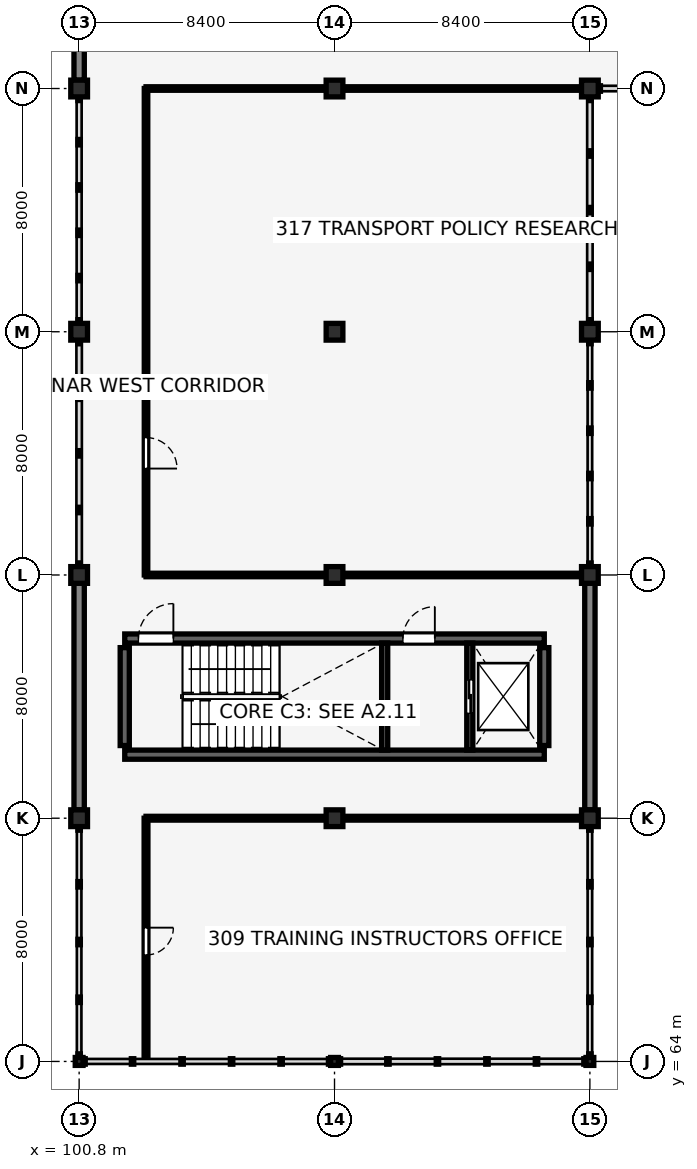
"""IFC4 building model, lengths in metres.
Left out: names, types, materials, properties, quantities, classifications, styles, units other than length and angle.
Written with IfcOpenShell. Run it as: python <this file> out.ifc"""

import sys

from ifc_helpers import new_model, si_unit, direction, frame, frame_2d, origin, origin_2d, place, context, subcontext, project, spatial, rectangle, i_section, extrude, element, fill, save


model = new_model("IFC4")
c1 = context("Model", 3, precision=1e-05, world=origin(), true_north=direction((0.0, 1.0)))
c2 = subcontext(c1, "Body", "Model", "MODEL_VIEW")
j1 = project(units=[si_unit("LENGTHUNIT", "METRE"), si_unit("PLANEANGLEUNIT", "RADIAN")], contexts=[c1])
p1 = place(None, origin())
s1 = spatial("IfcSite", under=j1, at=p1, CompositionType="ELEMENT")
p2 = place(p1, origin())
s2 = spatial("IfcBuilding", under=s1, at=p2, CompositionType="ELEMENT")
p3 = place(p2, frame((0.0, 0.0, 13.36)))
s3 = spatial("IfcBuildingStorey", under=s2, at=p3, CompositionType="ELEMENT", Elevation=13.36)
p4 = place(p3, frame((102.3, 74.09, 0.0), z_axis=(0.0, 0.0, 1.0), x_axis=(1.0, 0.0, 0.0)))
e1 = element("IfcWall", 1, at=p4, inside=s3, PredefinedType="SHEAR", context=c2, shape_type="SweptSolid", body=[
    extrude(rectangle(XDim=13.8, YDim=0.3, at=frame_2d((6.9, 0.0))), origin(), (0.0, 0.0, 1.0), 3.58),
])
p5 = place(p3, frame((102.3, 77.91, 0.0), z_axis=(0.0, 0.0, 1.0), x_axis=(1.0, 0.0, 0.0)))
e2 = element("IfcWall", 2, at=p5, inside=s3, PredefinedType="SHEAR", context=c2, shape_type="SweptSolid", body=[
    extrude(rectangle(XDim=13.8, YDim=0.3, at=frame_2d((6.9, 0.0))), origin(), (0.0, 0.0, 1.0), 3.58),
])
p6 = place(p5, frame((0.45, 0.0, 0.0), z_axis=(0.0, 0.0, 1.0), x_axis=(1.0, 0.0, 0.0)))
e3 = element("IfcOpeningElement", 3, at=p6, cuts=e2, PredefinedType="OPENING", context=c2, shape_type="SweptSolid", body=[
    extrude(rectangle(XDim=1.15, YDim=2.15, at=frame_2d((0.575, 1.075))), frame((0.0, 0.16, 0.0), z_axis=(0.0, -1.0, 0.0), x_axis=(1.0, 0.0, 0.0)), (0.0, 0.0, 1.0), 0.32),
])
p7 = place(p5, frame((9.15, 0.0, 0.0), z_axis=(0.0, 0.0, 1.0), x_axis=(1.0, 0.0, 0.0)))
e4 = element("IfcOpeningElement", 4, at=p7, cuts=e2, PredefinedType="OPENING", context=c2, shape_type="SweptSolid", body=[
    extrude(rectangle(XDim=1.05, YDim=2.15, at=frame_2d((0.525, 1.075))), frame((0.0, 0.16, 0.0), z_axis=(0.0, -1.0, 0.0), x_axis=(1.0, 0.0, 0.0)), (0.0, 0.0, 1.0), 0.32),
])
for number, where, z_axis, x_axis in (
    (5, (102.3, 74.39, 0.0), (0.0, 0.0, 1.0), (0.0, 1.0, 0.0)),
    (6, (116.1, 74.39, 0.0), (0.0, 0.0, 1.0), (0.0, 1.0, 0.0)),
):
    element("IfcWall", number, at=place(p3, frame(where, z_axis=z_axis, x_axis=x_axis)), inside=s3, PredefinedType="SHEAR", context=c2, shape_type="SweptSolid", body=[
        extrude(rectangle(XDim=3.22, YDim=0.3, at=frame_2d((1.61, 0.0))), origin(), (0.0, 0.0, 1.0), 3.58),
    ])
p8 = place(p3, frame((100.8, 64.0, 0.0), z_axis=(0.0, 0.0, 1.0), x_axis=(1.0, 0.0, 0.0)))
e7 = element("IfcColumn", 7, at=p8, inside=s3, PredefinedType="COLUMN", context=c2, shape_type="SweptSolid", body=[
    extrude(i_section(OverallWidth=0.256, OverallDepth=0.26, WebThickness=0.01, FlangeThickness=0.017, FilletRadius=0.013, at=origin_2d()), origin(), (0.0, 0.0, 1.0), 10.34),
])
for number, where, z_axis, x_axis in (
    (8, (100.8, 72.0, 0.0), (0.0, 0.0, 1.0), (1.0, 0.0, 0.0)),
    (9, (100.8, 80.0, 0.0), (0.0, 0.0, 1.0), (1.0, 0.0, 0.0)),
    (10, (100.8, 88.0, 0.0), (0.0, 0.0, 1.0), (1.0, 0.0, 0.0)),
    (11, (100.8, 96.0, 0.0), (0.0, 0.0, 1.0), (1.0, 0.0, 0.0)),
):
    element("IfcColumn", number, at=place(p3, frame(where, z_axis=z_axis, x_axis=x_axis)), inside=s3, PredefinedType="COLUMN", context=c2, shape_type="SweptSolid", body=[
        extrude(rectangle(XDim=0.55, YDim=0.55, at=origin_2d()), origin(), (0.0, 0.0, 1.0), 3.58),
    ])
p9 = place(p3, frame((109.2, 64.0, 0.0), z_axis=(0.0, 0.0, 1.0), x_axis=(1.0, 0.0, 0.0)))
e12 = element("IfcColumn", 12, at=p9, inside=s3, PredefinedType="COLUMN", context=c2, shape_type="SweptSolid", body=[
    extrude(i_section(OverallWidth=0.256, OverallDepth=0.26, WebThickness=0.01, FlangeThickness=0.017, FilletRadius=0.013, at=origin_2d()), origin(), (0.0, 0.0, 1.0), 3.58),
])
for number, where, z_axis, x_axis in (
    (13, (109.2, 72.0, 0.0), (0.0, 0.0, 1.0), (1.0, 0.0, 0.0)),
    (14, (109.2, 80.0, 0.0), (0.0, 0.0, 1.0), (1.0, 0.0, 0.0)),
    (15, (109.2, 88.0, 0.0), (0.0, 0.0, 1.0), (1.0, 0.0, 0.0)),
    (16, (109.2, 96.0, 0.0), (0.0, 0.0, 1.0), (1.0, 0.0, 0.0)),
):
    element("IfcColumn", number, at=place(p3, frame(where, z_axis=z_axis, x_axis=x_axis)), inside=s3, PredefinedType="COLUMN", context=c2, shape_type="SweptSolid", body=[
        extrude(rectangle(XDim=0.55, YDim=0.55, at=origin_2d()), origin(), (0.0, 0.0, 1.0), 3.58),
    ])
p10 = place(p3, frame((117.6, 64.0, 0.0), z_axis=(0.0, 0.0, 1.0), x_axis=(1.0, 0.0, 0.0)))
e17 = element("IfcColumn", 17, at=p10, inside=s3, PredefinedType="COLUMN", context=c2, shape_type="SweptSolid", body=[
    extrude(i_section(OverallWidth=0.256, OverallDepth=0.26, WebThickness=0.01, FlangeThickness=0.017, FilletRadius=0.013, at=origin_2d()), origin(), (0.0, 0.0, 1.0), 3.58),
])
for number, where, z_axis, x_axis in (
    (18, (117.6, 72.0, 0.0), (0.0, 0.0, 1.0), (1.0, 0.0, 0.0)),
    (19, (117.6, 80.0, 0.0), (0.0, 0.0, 1.0), (1.0, 0.0, 0.0)),
    (20, (117.6, 88.0, 0.0), (0.0, 0.0, 1.0), (1.0, 0.0, 0.0)),
    (21, (117.6, 96.0, 0.0), (0.0, 0.0, 1.0), (1.0, 0.0, 0.0)),
):
    element("IfcColumn", number, at=place(p3, frame(where, z_axis=z_axis, x_axis=x_axis)), inside=s3, PredefinedType="COLUMN", context=c2, shape_type="SweptSolid", body=[
        extrude(rectangle(XDim=0.55, YDim=0.55, at=origin_2d()), origin(), (0.0, 0.0, 1.0), 3.58),
    ])
for number, where, z_axis, x_axis in (
    (22, (117.6, 72.275, 0.0), (0.0, 0.0, 1.0), (0.0, 1.0, 0.0)),
    (23, (100.8, 72.275, 0.0), (0.0, 0.0, 1.0), (0.0, 1.0, 0.0)),
):
    element("IfcWall", number, at=place(p3, frame(where, z_axis=z_axis, x_axis=x_axis)), inside=s3, PredefinedType="SOLIDWALL", context=c2, shape_type="SweptSolid", body=[
        extrude(rectangle(XDim=7.45, YDim=0.34, at=frame_2d((3.725, 0.0))), origin(), (0.0, 0.0, 1.0), 3.28),
    ])
p11 = place(p3, frame((100.8, 96.275, 0.0), z_axis=(0.0, 0.0, 1.0), x_axis=(0.0, 1.0, 0.0)))
e24 = element("IfcWall", 24, at=p11, inside=s3, PredefinedType="SOLIDWALL", context=c2, shape_type="SweptSolid", body=[
    extrude(rectangle(XDim=7.595, YDim=0.34, at=frame_2d((3.797, 0.0))), origin(), (0.0, 0.0, 1.0), 3.28),
])
p12 = place(p11, frame((2.897, 0.0, 0.9), z_axis=(0.0, 0.0, 1.0), x_axis=(1.0, 0.0, 0.0)))
e25 = element("IfcOpeningElement", 25, at=p12, cuts=e24, PredefinedType="OPENING", context=c2, shape_type="SweptSolid", body=[
    extrude(rectangle(XDim=1.8, YDim=1.45, at=frame_2d((0.9, 0.725))), frame((0.0, 0.18, 0.0), z_axis=(0.0, -1.0, 0.0), x_axis=(1.0, 0.0, 0.0)), (0.0, 0.0, 1.0), 0.36),
])
p13 = place(p3, frame((110.85, 74.24, 0.0), z_axis=(0.0, 0.0, 1.0), x_axis=(0.0, 1.0, 0.0)))
e26 = element("IfcWall", 26, at=p13, inside=s3, PredefinedType="SHEAR", context=c2, shape_type="SweptSolid", body=[
    extrude(rectangle(XDim=3.52, YDim=0.2, at=frame_2d((1.76, 0.0))), origin(), (0.0, 0.0, 1.0), 3.58),
])
p14 = place(p3, frame((113.65, 74.24, 0.0), z_axis=(0.0, 0.0, 1.0), x_axis=(0.0, 1.0, 0.0)))
e27 = element("IfcWall", 27, at=p14, inside=s3, PredefinedType="SHEAR", context=c2, shape_type="SweptSolid", body=[
    extrude(rectangle(XDim=3.52, YDim=0.2, at=frame_2d((1.76, 0.0))), origin(), (0.0, 0.0, 1.0), 3.58),
])
p15 = place(p14, frame((1.21, 0.0, 0.0), z_axis=(0.0, 0.0, 1.0), x_axis=(1.0, 0.0, 0.0)))
e28 = element("IfcOpeningElement", 28, at=p15, cuts=e27, PredefinedType="OPENING", context=c2, shape_type="SweptSolid", body=[
    extrude(rectangle(XDim=1.1, YDim=2.15, at=frame_2d((0.55, 1.075))), frame((0.0, 0.11, 0.0), z_axis=(0.0, -1.0, 0.0), x_axis=(1.0, 0.0, 0.0)), (0.0, 0.0, 1.0), 0.22),
])
p16 = place(p3, frame((103.0, 64.04, 0.0), z_axis=(0.0, 0.0, 1.0), x_axis=(0.0, 1.0, 0.0)))
e29 = element("IfcWall", 29, at=p16, inside=s3, PredefinedType="PARTITIONING", context=c2, shape_type="SweptSolid", body=[
    extrude(rectangle(XDim=7.96, YDim=0.125, at=frame_2d((3.98, 0.0))), origin(), (0.0, 0.0, 1.0), 3.58),
])
p17 = place(p16, frame((4.36, 0.0, 0.0), z_axis=(0.0, 0.0, 1.0), x_axis=(-1.0, 0.0, 0.0)))
e30 = element("IfcOpeningElement", 30, at=p17, cuts=e29, PredefinedType="OPENING", context=c2, shape_type="SweptSolid", body=[
    extrude(rectangle(XDim=0.9, YDim=2.1, at=frame_2d((0.45, 1.05))), frame((0.0, 0.073, 0.0), z_axis=(0.0, -1.0, 0.0), x_axis=(1.0, 0.0, 0.0)), (0.0, 0.0, 1.0), 0.145),
])
p18 = place(p3, frame((103.0, 80.0, 0.0), z_axis=(0.0, 0.0, 1.0), x_axis=(0.0, 1.0, 0.0)))
e31 = element("IfcWall", 31, at=p18, inside=s3, PredefinedType="PARTITIONING", context=c2, shape_type="SweptSolid", body=[
    extrude(rectangle(XDim=16.0, YDim=0.115, at=frame_2d((8.0, 0.0))), origin(), (0.0, 0.0, 1.0), 3.58),
])
p19 = place(p18, frame((4.52, 0.0, 0.0), z_axis=(0.0, 0.0, 1.0), x_axis=(-1.0, 0.0, 0.0)))
e32 = element("IfcOpeningElement", 32, at=p19, cuts=e31, PredefinedType="OPENING", context=c2, shape_type="SweptSolid", body=[
    extrude(rectangle(XDim=1.02, YDim=2.16, at=frame_2d((0.51, 1.08))), frame((0.0, 0.067, 0.0), z_axis=(0.0, -1.0, 0.0), x_axis=(1.0, 0.0, 0.0)), (0.0, 0.0, 1.0), 0.135),
])
p20 = place(p3, frame((103.0, 72.0, 0.0), z_axis=(0.0, 0.0, 1.0), x_axis=(1.0, 0.0, 0.0)))
e33 = element("IfcWall", 33, at=p20, inside=s3, PredefinedType="PARTITIONING", context=c2, shape_type="SweptSolid", body=[
    extrude(rectangle(XDim=5.935, YDim=0.125, at=frame_2d((2.968, 0.0))), origin(), (0.0, 0.0, 1.0), 3.123),
])
p21 = place(p3, frame((109.465, 72.0, 0.0), z_axis=(0.0, 0.0, 1.0), x_axis=(1.0, 0.0, 0.0)))
e34 = element("IfcWall", 34, at=p21, inside=s3, PredefinedType="PARTITIONING", context=c2, shape_type="SweptSolid", body=[
    extrude(rectangle(XDim=7.87, YDim=0.125, at=frame_2d((3.935, 0.0))), origin(), (0.0, 0.0, 1.0), 3.123),
])
p22 = place(p3, frame((103.0, 80.0, 0.0), z_axis=(0.0, 0.0, 1.0), x_axis=(1.0, 0.0, 0.0)))
e35 = element("IfcWall", 35, at=p22, inside=s3, PredefinedType="PARTITIONING", context=c2, shape_type="SweptSolid", body=[
    extrude(rectangle(XDim=5.935, YDim=0.115, at=frame_2d((2.968, 0.0))), origin(), (0.0, 0.0, 1.0), 3.123),
])
p23 = place(p3, frame((109.465, 80.0, 0.0), z_axis=(0.0, 0.0, 1.0), x_axis=(1.0, 0.0, 0.0)))
e36 = element("IfcWall", 36, at=p23, inside=s3, PredefinedType="PARTITIONING", context=c2, shape_type="SweptSolid", body=[
    extrude(rectangle(XDim=7.87, YDim=0.115, at=frame_2d((3.935, 0.0))), origin(), (0.0, 0.0, 1.0), 3.123),
])
p24 = place(p3, frame((103.0, 96.0, 0.0), z_axis=(0.0, 0.0, 1.0), x_axis=(1.0, 0.0, 0.0)))
e37 = element("IfcWall", 37, at=p24, inside=s3, PredefinedType="PARTITIONING", context=c2, shape_type="SweptSolid", body=[
    extrude(rectangle(XDim=5.935, YDim=0.115, at=frame_2d((2.968, 0.0))), origin(), (0.0, 0.0, 1.0), 3.123),
])
p25 = place(p3, frame((109.465, 96.0, 0.0), z_axis=(0.0, 0.0, 1.0), x_axis=(1.0, 0.0, 0.0)))
e38 = element("IfcWall", 38, at=p25, inside=s3, PredefinedType="PARTITIONING", context=c2, shape_type="SweptSolid", body=[
    extrude(rectangle(XDim=7.87, YDim=0.115, at=frame_2d((3.935, 0.0))), origin(), (0.0, 0.0, 1.0), 3.123),
])
p26 = place(p6, origin())
e39 = element("IfcDoor", 39, at=p26, inside=s3, OperationType="SINGLE_SWING_RIGHT", PredefinedType="DOOR", context=c2, shape_type="SweptSolid", body=[
    extrude(rectangle(XDim=1.15, YDim=2.15, at=frame_2d((0.575, 1.075))), frame((0.0, 0.025, 0.0), z_axis=(0.0, -1.0, 0.0), x_axis=(1.0, 0.0, 0.0)), (0.0, 0.0, 1.0), 0.05),
])
fill(e3, e39)
p27 = place(p7, origin())
e40 = element("IfcDoor", 40, at=p27, inside=s3, OperationType="SINGLE_SWING_RIGHT", PredefinedType="DOOR", context=c2, shape_type="SweptSolid", body=[
    extrude(rectangle(XDim=1.05, YDim=2.15, at=frame_2d((0.525, 1.075))), frame((0.0, 0.025, 0.0), z_axis=(0.0, -1.0, 0.0), x_axis=(1.0, 0.0, 0.0)), (0.0, 0.0, 1.0), 0.05),
])
fill(e4, e40)
p28 = place(p15, origin())
e41 = element("IfcDoor", 41, at=p28, inside=s3, OperationType="DOUBLE_DOOR_SLIDING", PredefinedType="DOOR", context=c2, shape_type="SweptSolid", body=[
    extrude(rectangle(XDim=1.1, YDim=2.15, at=frame_2d((0.55, 1.075))), frame((0.0, 0.025, 0.0), z_axis=(0.0, -1.0, 0.0), x_axis=(1.0, 0.0, 0.0)), (0.0, 0.0, 1.0), 0.05),
])
fill(e28, e41)
p29 = place(p17, origin())
e42 = element("IfcDoor", 42, at=p29, inside=s3, OperationType="SINGLE_SWING_LEFT", PredefinedType="DOOR", context=c2, shape_type="SweptSolid", body=[
    extrude(rectangle(XDim=0.9, YDim=2.1, at=frame_2d((0.45, 1.05))), frame((0.0, 0.025, 0.0), z_axis=(0.0, -1.0, 0.0), x_axis=(1.0, 0.0, 0.0)), (0.0, 0.0, 1.0), 0.05),
])
fill(e30, e42)
p30 = place(p19, origin())
e43 = element("IfcDoor", 43, at=p30, inside=s3, OperationType="SINGLE_SWING_RIGHT", PredefinedType="DOOR", context=c2, shape_type="SweptSolid", body=[
    extrude(rectangle(XDim=1.02, YDim=2.16, at=frame_2d((0.51, 1.08))), frame((0.0, 0.025, 0.0), z_axis=(0.0, -1.0, 0.0), x_axis=(1.0, 0.0, 0.0)), (0.0, 0.0, 1.0), 0.05),
])
fill(e32, e43)
save(model, sys.argv[1])
